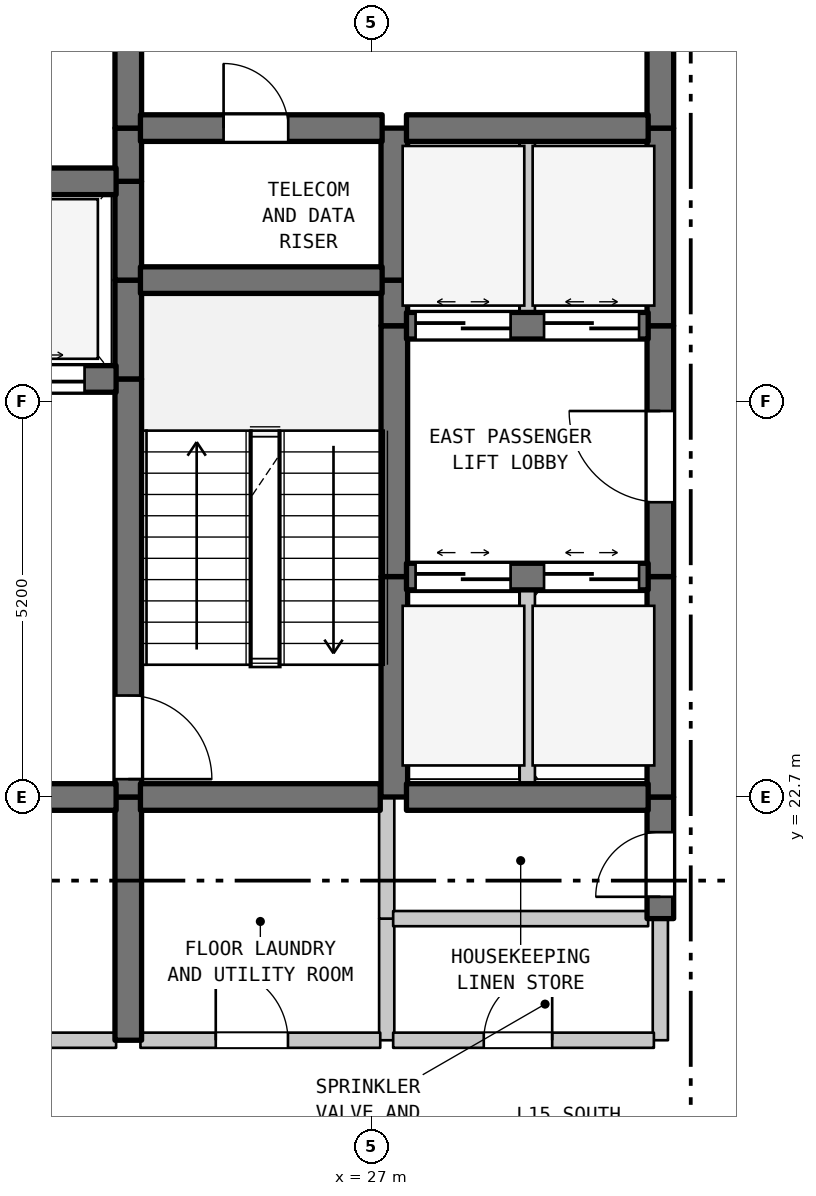
"""IFC4 building model, lengths in metres.
Left out: names, types, materials, properties, quantities, classifications, styles, units other than length and angle.
Written with IfcOpenShell. Run it as: python <this file> out.ifc"""

import sys

from ifc_helpers import new_model, si_unit, direction, frame, frame_2d, origin, place, context, subcontext, project, spatial, rectangle, extrude, element, fill, save


model = new_model("IFC4")
c1 = context("Model", 3, precision=1e-05, world=origin(), true_north=direction((0.0, 1.0)))
c2 = subcontext(c1, "Body", "Model", "MODEL_VIEW")
j1 = project(units=[si_unit("LENGTHUNIT", "METRE"), si_unit("PLANEANGLEUNIT", "RADIAN")], contexts=[c1])
p1 = place(None, origin())
s1 = spatial("IfcSite", under=j1, at=p1, CompositionType="ELEMENT")
p2 = place(p1, origin())
s2 = spatial("IfcBuilding", under=s1, at=p2, CompositionType="ELEMENT")
p3 = place(p2, frame((0.0, 0.0, 65.6)))
s3 = spatial("IfcBuildingStorey", under=s2, at=p3, CompositionType="ELEMENT", Elevation=65.6)
p4 = place(p3, frame((23.8, 19.5, 0.0), z_axis=(0.0, 0.0, 1.0), x_axis=(0.0, 1.0, 0.0)))
e1 = element("IfcWall", 1, at=p4, inside=s3, PredefinedType="SHEAR", context=c2, shape_type="SweptSolid", body=[
    extrude(rectangle(XDim=3.2, YDim=0.35, at=frame_2d((1.6, 0.0))), origin(), (0.0, 0.0, 1.0), 4.185),
])
p5 = place(p3, frame((23.8, 22.7, 0.0), z_axis=(0.0, 0.0, 1.0), x_axis=(0.0, 1.0, 0.0)))
e2 = element("IfcWall", 2, at=p5, inside=s3, PredefinedType="SHEAR", context=c2, shape_type="SweptSolid", body=[
    extrude(rectangle(XDim=5.5, YDim=0.35, at=frame_2d((2.75, 0.0))), origin(), (0.0, 0.0, 1.0), 4.185),
])
p6 = place(p5, frame((0.235, 0.0, 0.0)))
e3 = element("IfcOpeningElement", 3, at=p6, cuts=e2, PredefinedType="OPENING", context=c2, shape_type="SweptSolid", body=[
    extrude(rectangle(XDim=1.1, YDim=2.15, at=frame_2d((0.55, 1.075))), frame((0.0, 0.185, 0.0), z_axis=(0.0, -1.0, 0.0), x_axis=(1.0, 0.0, 0.0)), (0.0, 0.0, 1.0), 0.37),
])
for number, where, z_axis, x_axis in (
    (4, (23.8, 28.2, 0.0), (0.0, 0.0, 1.0), (0.0, 1.0, 0.0)),
    (5, (23.8, 29.5, 0.0), (0.0, 0.0, 1.0), (0.0, 1.0, 0.0)),
):
    element("IfcWall", number, at=place(p3, frame(where, z_axis=z_axis, x_axis=x_axis)), inside=s3, PredefinedType="SHEAR", context=c2, shape_type="SweptSolid", body=[
        extrude(rectangle(XDim=1.3, YDim=0.35, at=frame_2d((0.65, 0.0))), origin(), (0.0, 0.0, 1.0), 4.185),
    ])
p7 = place(p3, frame((23.8, 30.8, 0.0), z_axis=(0.0, 0.0, 1.0), x_axis=(0.0, 1.0, 0.0)))
e6 = element("IfcWall", 6, at=p7, inside=s3, PredefinedType="SHEAR", context=c2, shape_type="SweptSolid", body=[
    extrude(rectangle(XDim=0.7, YDim=0.35, at=frame_2d((0.35, 0.0))), origin(), (0.0, 0.0, 1.0), 4.185),
])
p8 = place(p3, frame((23.8, 31.5, 0.0), z_axis=(0.0, 0.0, 1.0), x_axis=(0.0, 1.0, 0.0)))
e7 = element("IfcWall", 7, at=p8, inside=s3, PredefinedType="SHEAR", context=c2, shape_type="SweptSolid", body=[
    extrude(rectangle(XDim=3.5, YDim=0.35, at=frame_2d((1.75, 0.0))), origin(), (0.0, 0.0, 1.0), 4.185),
])
p9 = place(p8, frame((1.127, 0.0, 0.0)))
e8 = element("IfcOpeningElement", 8, at=p9, cuts=e7, PredefinedType="OPENING", context=c2, shape_type="SweptSolid", body=[
    extrude(rectangle(XDim=1.1, YDim=2.15, at=frame_2d((0.55, 1.075))), frame((0.0, 0.185, 0.0), z_axis=(0.0, -1.0, 0.0), x_axis=(1.0, 0.0, 0.0)), (0.0, 0.0, 1.0), 0.37),
])
p10 = place(p3, frame((27.2, 19.5, 0.0), z_axis=(0.0, 0.0, 1.0), x_axis=(0.0, 1.0, 0.0)))
e9 = element("IfcWall", 9, at=p10, inside=s3, PredefinedType="STANDARD", context=c2, shape_type="SweptSolid", body=[
    extrude(rectangle(XDim=1.6, YDim=0.2, at=frame_2d((0.8, 0.0))), origin(), (0.0, 0.0, 1.0), 4.185),
])
p11 = place(p3, frame((27.2, 21.1, 0.0), z_axis=(0.0, 0.0, 1.0), x_axis=(0.0, 1.0, 0.0)))
e10 = element("IfcWall", 10, at=p11, inside=s3, PredefinedType="STANDARD", context=c2, shape_type="SweptSolid", body=[
    extrude(rectangle(XDim=1.6, YDim=0.2, at=frame_2d((0.8, 0.0))), origin(), (0.0, 0.0, 1.0), 4.185),
])
p12 = place(p3, frame((27.3, 22.7, 0.0), z_axis=(0.0, 0.0, 1.0), x_axis=(0.0, 1.0, 0.0)))
e11 = element("IfcWall", 11, at=p12, inside=s3, PredefinedType="SHEAR", context=c2, shape_type="SweptSolid", body=[
    extrude(rectangle(XDim=2.9, YDim=0.35, at=frame_2d((1.45, 0.0))), origin(), (0.0, 0.0, 1.0), 4.185),
])
p13 = place(p3, frame((27.3, 25.6, 0.0), z_axis=(0.0, 0.0, 1.0), x_axis=(0.0, 1.0, 0.0)))
e12 = element("IfcWall", 12, at=p13, inside=s3, PredefinedType="SHEAR", context=c2, shape_type="SweptSolid", body=[
    extrude(rectangle(XDim=3.3, YDim=0.35, at=frame_2d((1.65, 0.0))), origin(), (0.0, 0.0, 1.0), 4.185),
])
p14 = place(p3, frame((27.3, 28.9, 0.0), z_axis=(0.0, 0.0, 1.0), x_axis=(0.0, 1.0, 0.0)))
e13 = element("IfcWall", 13, at=p14, inside=s3, PredefinedType="SHEAR", context=c2, shape_type="SweptSolid", body=[
    extrude(rectangle(XDim=0.6, YDim=0.35, at=frame_2d((0.3, 0.0))), origin(), (0.0, 0.0, 1.0), 4.185),
])
p15 = place(p3, frame((27.3, 29.5, 0.0), z_axis=(0.0, 0.0, 1.0), x_axis=(0.0, 1.0, 0.0)))
e14 = element("IfcWall", 14, at=p15, inside=s3, PredefinedType="SHEAR", context=c2, shape_type="SweptSolid", body=[
    extrude(rectangle(XDim=2.0, YDim=0.35, at=frame_2d((1.0, 0.0))), origin(), (0.0, 0.0, 1.0), 4.185),
])
p16 = place(p3, frame((29.05, 22.7, 0.0), z_axis=(0.0, 0.0, 1.0), x_axis=(0.0, 1.0, 0.0)))
e15 = element("IfcWall", 15, at=p16, inside=s3, PredefinedType="STANDARD", context=c2, shape_type="SweptSolid", body=[
    extrude(rectangle(XDim=2.9, YDim=0.2, at=frame_2d((1.45, 0.0))), origin(), (0.0, 0.0, 1.0), 4.185),
])
p17 = place(p3, frame((29.05, 28.9, 0.0), z_axis=(0.0, 0.0, 1.0), x_axis=(0.0, 1.0, 0.0)))
e16 = element("IfcWall", 16, at=p17, inside=s3, PredefinedType="STANDARD", context=c2, shape_type="SweptSolid", body=[
    extrude(rectangle(XDim=2.6, YDim=0.2, at=frame_2d((1.3, 0.0))), origin(), (0.0, 0.0, 1.0), 4.185),
])
p18 = place(p3, frame((30.8, 19.5, 0.0), z_axis=(0.0, 0.0, 1.0), x_axis=(0.0, 1.0, 0.0)))
e17 = element("IfcWall", 17, at=p18, inside=s3, PredefinedType="STANDARD", context=c2, shape_type="SweptSolid", body=[
    extrude(rectangle(XDim=1.6, YDim=0.2, at=frame_2d((0.8, 0.0))), origin(), (0.0, 0.0, 1.0), 4.185),
])
p19 = place(p3, frame((30.8, 21.1, 0.0), z_axis=(0.0, 0.0, 1.0), x_axis=(0.0, 1.0, 0.0)))
e18 = element("IfcWall", 18, at=p19, inside=s3, PredefinedType="SHEAR", context=c2, shape_type="SweptSolid", body=[
    extrude(rectangle(XDim=1.6, YDim=0.35, at=frame_2d((0.8, 0.0))), origin(), (0.0, 0.0, 1.0), 4.185),
])
p20 = place(p19, frame((0.287, 0.0, 0.0)))
e19 = element("IfcOpeningElement", 19, at=p20, cuts=e18, PredefinedType="OPENING", context=c2, shape_type="SweptSolid", body=[
    extrude(rectangle(XDim=0.85, YDim=2.1, at=frame_2d((0.425, 1.05))), frame((0.0, 0.185, 0.0), z_axis=(0.0, -1.0, 0.0), x_axis=(1.0, 0.0, 0.0)), (0.0, 0.0, 1.0), 0.37),
])
p21 = place(p3, frame((30.8, 22.7, 0.0), z_axis=(0.0, 0.0, 1.0), x_axis=(0.0, 1.0, 0.0)))
e20 = element("IfcWall", 20, at=p21, inside=s3, PredefinedType="SHEAR", context=c2, shape_type="SweptSolid", body=[
    extrude(rectangle(XDim=2.9, YDim=0.35, at=frame_2d((1.45, 0.0))), origin(), (0.0, 0.0, 1.0), 4.185),
])
p22 = place(p3, frame((30.8, 25.6, 0.0), z_axis=(0.0, 0.0, 1.0), x_axis=(0.0, 1.0, 0.0)))
e21 = element("IfcWall", 21, at=p22, inside=s3, PredefinedType="SHEAR", context=c2, shape_type="SweptSolid", body=[
    extrude(rectangle(XDim=3.3, YDim=0.35, at=frame_2d((1.65, 0.0))), origin(), (0.0, 0.0, 1.0), 4.185),
])
p23 = place(p22, frame((0.978, 0.0, 0.0)))
e22 = element("IfcOpeningElement", 22, at=p23, cuts=e21, PredefinedType="OPENING", context=c2, shape_type="SweptSolid", body=[
    extrude(rectangle(XDim=1.2, YDim=2.2, at=frame_2d((0.6, 1.1))), frame((0.0, 0.185, 0.0), z_axis=(0.0, -1.0, 0.0), x_axis=(1.0, 0.0, 0.0)), (0.0, 0.0, 1.0), 0.37),
])
p24 = place(p3, frame((30.8, 28.9, 0.0), z_axis=(0.0, 0.0, 1.0), x_axis=(0.0, 1.0, 0.0)))
e23 = element("IfcWall", 23, at=p24, inside=s3, PredefinedType="SHEAR", context=c2, shape_type="SweptSolid", body=[
    extrude(rectangle(XDim=2.6, YDim=0.35, at=frame_2d((1.3, 0.0))), origin(), (0.0, 0.0, 1.0), 4.185),
])
p25 = place(p3, frame((30.8, 31.5, 0.0), z_axis=(0.0, 0.0, 1.0), x_axis=(0.0, 1.0, 0.0)))
e24 = element("IfcWall", 24, at=p25, inside=s3, PredefinedType="SHEAR", context=c2, shape_type="SweptSolid", body=[
    extrude(rectangle(XDim=3.5, YDim=0.35, at=frame_2d((1.75, 0.0))), origin(), (0.0, 0.0, 1.0), 4.185),
])
p26 = place(p25, frame((1.15, 0.0, 0.0)))
e25 = element("IfcOpeningElement", 25, at=p26, cuts=e24, PredefinedType="OPENING", context=c2, shape_type="SweptSolid", body=[
    extrude(rectangle(XDim=1.2, YDim=2.2, at=frame_2d((0.6, 1.1))), frame((0.0, 0.185, 0.0), z_axis=(0.0, -1.0, 0.0), x_axis=(1.0, 0.0, 0.0)), (0.0, 0.0, 1.0), 0.37),
])
p27 = place(p3, frame((19.16, 19.5, 0.0), z_axis=(0.0, 0.0, 1.0), x_axis=(1.0, 0.0, 0.0)))
e26 = element("IfcWall", 26, at=p27, inside=s3, PredefinedType="STANDARD", context=c2, shape_type="SweptSolid", body=[
    extrude(rectangle(XDim=4.48, YDim=0.2, at=frame_2d((2.24, 0.0))), origin(), (0.0, 0.0, 1.0), 4.185),
])
p28 = place(p27, frame((1.64, 0.0, 0.0)))
e27 = element("IfcOpeningElement", 27, at=p28, cuts=e26, PredefinedType="OPENING", context=c2, shape_type="SweptSolid", body=[
    extrude(rectangle(XDim=1.2, YDim=2.2, at=frame_2d((0.6, 1.1))), frame((0.0, 0.11, 0.0), z_axis=(0.0, -1.0, 0.0), x_axis=(1.0, 0.0, 0.0)), (0.0, 0.0, 1.0), 0.22),
])
p29 = place(p3, frame((23.96, 19.5, 0.0), z_axis=(0.0, 0.0, 1.0), x_axis=(1.0, 0.0, 0.0)))
e28 = element("IfcWall", 28, at=p29, inside=s3, PredefinedType="STANDARD", context=c2, shape_type="SweptSolid", body=[
    extrude(rectangle(XDim=3.155, YDim=0.2, at=frame_2d((1.578, 0.0))), origin(), (0.0, 0.0, 1.0), 4.185),
])
p30 = place(p29, frame((0.991, 0.0, 0.0)))
e29 = element("IfcOpeningElement", 29, at=p30, cuts=e28, PredefinedType="OPENING", context=c2, shape_type="SweptSolid", body=[
    extrude(rectangle(XDim=0.95, YDim=2.15, at=frame_2d((0.475, 1.075))), frame((0.0, 0.11, 0.0), z_axis=(0.0, -1.0, 0.0), x_axis=(1.0, 0.0, 0.0)), (0.0, 0.0, 1.0), 0.22),
])
p31 = place(p3, frame((27.285, 19.5, 0.0), z_axis=(0.0, 0.0, 1.0), x_axis=(1.0, 0.0, 0.0)))
e30 = element("IfcWall", 30, at=p31, inside=s3, PredefinedType="STANDARD", context=c2, shape_type="SweptSolid", body=[
    extrude(rectangle(XDim=3.43, YDim=0.2, at=frame_2d((1.715, 0.0))), origin(), (0.0, 0.0, 1.0), 4.185),
])
p32 = place(p31, frame((1.192, 0.0, 0.0)))
e31 = element("IfcOpeningElement", 31, at=p32, cuts=e30, PredefinedType="OPENING", context=c2, shape_type="SweptSolid", body=[
    extrude(rectangle(XDim=0.9, YDim=2.15, at=frame_2d((0.45, 1.075))), frame((0.0, 0.11, 0.0), z_axis=(0.0, -1.0, 0.0), x_axis=(1.0, 0.0, 0.0)), (0.0, 0.0, 1.0), 0.22),
])
p33 = place(p3, frame((27.285, 21.1, 0.0), z_axis=(0.0, 0.0, 1.0), x_axis=(1.0, 0.0, 0.0)))
e32 = element("IfcWall", 32, at=p33, inside=s3, PredefinedType="STANDARD", context=c2, shape_type="SweptSolid", body=[
    extrude(rectangle(XDim=3.355, YDim=0.2, at=frame_2d((1.677, 0.0))), origin(), (0.0, 0.0, 1.0), 4.185),
])
p34 = place(p3, frame((19.16, 22.7, 0.0), z_axis=(0.0, 0.0, 1.0), x_axis=(1.0, 0.0, 0.0)))
e33 = element("IfcWall", 33, at=p34, inside=s3, PredefinedType="SHEAR", context=c2, shape_type="SweptSolid", body=[
    extrude(rectangle(XDim=4.48, YDim=0.35, at=frame_2d((2.24, 0.0))), origin(), (0.0, 0.0, 1.0), 4.185),
])
p35 = place(p34, frame((1.64, 0.0, 0.0)))
e34 = element("IfcOpeningElement", 34, at=p35, cuts=e33, PredefinedType="OPENING", context=c2, shape_type="SweptSolid", body=[
    extrude(rectangle(XDim=1.2, YDim=2.2, at=frame_2d((0.6, 1.1))), frame((0.0, 0.185, 0.0), z_axis=(0.0, -1.0, 0.0), x_axis=(1.0, 0.0, 0.0)), (0.0, 0.0, 1.0), 0.37),
])
p36 = place(p3, frame((23.96, 22.7, 0.0), z_axis=(0.0, 0.0, 1.0), x_axis=(1.0, 0.0, 0.0)))
e35 = element("IfcWall", 35, at=p36, inside=s3, PredefinedType="SHEAR", context=c2, shape_type="SweptSolid", body=[
    extrude(rectangle(XDim=3.155, YDim=0.35, at=frame_2d((1.578, 0.0))), origin(), (0.0, 0.0, 1.0), 4.185),
])
p37 = place(p3, frame((27.46, 22.7, 0.0), z_axis=(0.0, 0.0, 1.0), x_axis=(1.0, 0.0, 0.0)))
e36 = element("IfcWall", 36, at=p37, inside=s3, PredefinedType="SHEAR", context=c2, shape_type="SweptSolid", body=[
    extrude(rectangle(XDim=3.18, YDim=0.35, at=frame_2d((1.59, 0.0))), origin(), (0.0, 0.0, 1.0), 4.185),
])
p38 = place(p3, frame((27.46, 25.6, 0.0), z_axis=(0.0, 0.0, 1.0), x_axis=(1.0, 0.0, 0.0)))
e37 = element("IfcWall", 37, at=p38, inside=s3, PredefinedType="SHEAR", context=c2, shape_type="SweptSolid", body=[
    extrude(rectangle(XDim=3.18, YDim=0.35, at=frame_2d((1.59, 0.0))), origin(), (0.0, 0.0, 1.0), 4.185),
])
p39 = place(p38, frame((0.12, 0.0, 0.0)))
e38 = element("IfcOpeningElement", 38, at=p39, cuts=e37, PredefinedType="OPENING", context=c2, shape_type="SweptSolid", body=[
    extrude(rectangle(XDim=1.25, YDim=2.2, at=frame_2d((0.625, 1.1))), frame((0.0, 0.185, 0.0), z_axis=(0.0, -1.0, 0.0), x_axis=(1.0, 0.0, 0.0)), (0.0, 0.0, 1.0), 0.37),
])
p40 = place(p38, frame((1.81, 0.0, 0.0)))
e39 = element("IfcOpeningElement", 39, at=p40, cuts=e37, PredefinedType="OPENING", context=c2, shape_type="SweptSolid", body=[
    extrude(rectangle(XDim=1.25, YDim=2.2, at=frame_2d((0.625, 1.1))), frame((0.0, 0.185, 0.0), z_axis=(0.0, -1.0, 0.0), x_axis=(1.0, 0.0, 0.0)), (0.0, 0.0, 1.0), 0.37),
])
p41 = place(p3, frame((19.16, 28.2, 0.0), z_axis=(0.0, 0.0, 1.0), x_axis=(1.0, 0.0, 0.0)))
e40 = element("IfcWall", 40, at=p41, inside=s3, PredefinedType="SHEAR", context=c2, shape_type="SweptSolid", body=[
    extrude(rectangle(XDim=4.48, YDim=0.35, at=frame_2d((2.24, 0.0))), origin(), (0.0, 0.0, 1.0), 4.185),
])
p42 = place(p41, frame((0.415, 0.0, 0.0)))
e41 = element("IfcOpeningElement", 41, at=p42, cuts=e40, PredefinedType="OPENING", context=c2, shape_type="SweptSolid", body=[
    extrude(rectangle(XDim=1.25, YDim=2.2, at=frame_2d((0.625, 1.1))), frame((0.0, 0.185, 0.0), z_axis=(0.0, -1.0, 0.0), x_axis=(1.0, 0.0, 0.0)), (0.0, 0.0, 1.0), 0.37),
])
p43 = place(p41, frame((2.815, 0.0, 0.0)))
e42 = element("IfcOpeningElement", 42, at=p43, cuts=e40, PredefinedType="OPENING", context=c2, shape_type="SweptSolid", body=[
    extrude(rectangle(XDim=1.25, YDim=2.2, at=frame_2d((0.625, 1.1))), frame((0.0, 0.185, 0.0), z_axis=(0.0, -1.0, 0.0), x_axis=(1.0, 0.0, 0.0)), (0.0, 0.0, 1.0), 0.37),
])
p44 = place(p3, frame((27.46, 28.9, 0.0), z_axis=(0.0, 0.0, 1.0), x_axis=(1.0, 0.0, 0.0)))
e43 = element("IfcWall", 43, at=p44, inside=s3, PredefinedType="SHEAR", context=c2, shape_type="SweptSolid", body=[
    extrude(rectangle(XDim=3.18, YDim=0.35, at=frame_2d((1.59, 0.0))), origin(), (0.0, 0.0, 1.0), 4.185),
])
p45 = place(p44, frame((0.12, 0.0, 0.0)))
e44 = element("IfcOpeningElement", 44, at=p45, cuts=e43, PredefinedType="OPENING", context=c2, shape_type="SweptSolid", body=[
    extrude(rectangle(XDim=1.25, YDim=2.2, at=frame_2d((0.625, 1.1))), frame((0.0, 0.185, 0.0), z_axis=(0.0, -1.0, 0.0), x_axis=(1.0, 0.0, 0.0)), (0.0, 0.0, 1.0), 0.37),
])
p46 = place(p44, frame((1.81, 0.0, 0.0)))
e45 = element("IfcOpeningElement", 45, at=p46, cuts=e43, PredefinedType="OPENING", context=c2, shape_type="SweptSolid", body=[
    extrude(rectangle(XDim=1.25, YDim=2.2, at=frame_2d((0.625, 1.1))), frame((0.0, 0.185, 0.0), z_axis=(0.0, -1.0, 0.0), x_axis=(1.0, 0.0, 0.0)), (0.0, 0.0, 1.0), 0.37),
])
p47 = place(p3, frame((23.96, 29.5, 0.0), z_axis=(0.0, 0.0, 1.0), x_axis=(1.0, 0.0, 0.0)))
e46 = element("IfcWall", 46, at=p47, inside=s3, PredefinedType="SHEAR", context=c2, shape_type="SweptSolid", body=[
    extrude(rectangle(XDim=3.18, YDim=0.35, at=frame_2d((1.59, 0.0))), origin(), (0.0, 0.0, 1.0), 4.185),
])
p48 = place(p3, frame((19.16, 30.8, 0.0), z_axis=(0.0, 0.0, 1.0), x_axis=(1.0, 0.0, 0.0)))
e47 = element("IfcWall", 47, at=p48, inside=s3, PredefinedType="SHEAR", context=c2, shape_type="SweptSolid", body=[
    extrude(rectangle(XDim=4.48, YDim=0.35, at=frame_2d((2.24, 0.0))), origin(), (0.0, 0.0, 1.0), 4.185),
])
p49 = place(p3, frame((23.96, 31.5, 0.0), z_axis=(0.0, 0.0, 1.0), x_axis=(1.0, 0.0, 0.0)))
e48 = element("IfcWall", 48, at=p49, inside=s3, PredefinedType="SHEAR", context=c2, shape_type="SweptSolid", body=[
    extrude(rectangle(XDim=3.18, YDim=0.35, at=frame_2d((1.59, 0.0))), origin(), (0.0, 0.0, 1.0), 4.185),
])
p50 = place(p49, frame((1.094, 0.0, 0.0)))
e49 = element("IfcOpeningElement", 49, at=p50, cuts=e48, PredefinedType="OPENING", context=c2, shape_type="SweptSolid", body=[
    extrude(rectangle(XDim=0.85, YDim=2.1, at=frame_2d((0.425, 1.05))), frame((0.0, 0.185, 0.0), z_axis=(0.0, -1.0, 0.0), x_axis=(1.0, 0.0, 0.0)), (0.0, 0.0, 1.0), 0.37),
])
p51 = place(p3, frame((27.46, 31.5, 0.0), z_axis=(0.0, 0.0, 1.0), x_axis=(1.0, 0.0, 0.0)))
e50 = element("IfcWall", 50, at=p51, inside=s3, PredefinedType="SHEAR", context=c2, shape_type="SweptSolid", body=[
    extrude(rectangle(XDim=3.18, YDim=0.35, at=frame_2d((1.59, 0.0))), origin(), (0.0, 0.0, 1.0), 4.185),
])
p52 = place(p6, frame((1.1, 0.0, 0.0), z_axis=(0.0, 0.0, 1.0), x_axis=(-1.0, 0.0, 0.0)))
e51 = element("IfcDoor", 51, at=p52, inside=s3, OperationType="SINGLE_SWING_LEFT", PredefinedType="DOOR", context=c2, shape_type="SweptSolid", body=[
    extrude(rectangle(XDim=1.1, YDim=2.15, at=frame_2d((0.55, 1.075))), frame((0.0, 0.025, 0.0), z_axis=(0.0, -1.0, 0.0), x_axis=(1.0, 0.0, 0.0)), (0.0, 0.0, 1.0), 0.05),
])
fill(e3, e51)
p53 = place(p20, origin())
e52 = element("IfcDoor", 52, at=p53, inside=s3, OperationType="SINGLE_SWING_LEFT", PredefinedType="DOOR", context=c2, shape_type="SweptSolid", body=[
    extrude(rectangle(XDim=0.85, YDim=2.1, at=frame_2d((0.425, 1.05))), frame((0.0, 0.025, 0.0), z_axis=(0.0, -1.0, 0.0), x_axis=(1.0, 0.0, 0.0)), (0.0, 0.0, 1.0), 0.05),
])
fill(e19, e52)
p54 = place(p23, origin())
e53 = element("IfcDoor", 53, at=p54, inside=s3, OperationType="SINGLE_SWING_RIGHT", PredefinedType="DOOR", context=c2, shape_type="SweptSolid", body=[
    extrude(rectangle(XDim=1.2, YDim=2.2, at=frame_2d((0.6, 1.1))), frame((0.0, 0.025, 0.0), z_axis=(0.0, -1.0, 0.0), x_axis=(1.0, 0.0, 0.0)), (0.0, 0.0, 1.0), 0.05),
])
fill(e22, e53)
p55 = place(p30, origin())
e54 = element("IfcDoor", 54, at=p55, inside=s3, OperationType="SINGLE_SWING_LEFT", PredefinedType="DOOR", context=c2, shape_type="SweptSolid", body=[
    extrude(rectangle(XDim=0.95, YDim=2.15, at=frame_2d((0.475, 1.075))), frame((0.0, 0.025, 0.0), z_axis=(0.0, -1.0, 0.0), x_axis=(1.0, 0.0, 0.0)), (0.0, 0.0, 1.0), 0.05),
])
fill(e29, e54)
p56 = place(p32, origin())
e55 = element("IfcDoor", 55, at=p56, inside=s3, OperationType="SINGLE_SWING_RIGHT", PredefinedType="DOOR", context=c2, shape_type="SweptSolid", body=[
    extrude(rectangle(XDim=0.9, YDim=2.15, at=frame_2d((0.45, 1.075))), frame((0.0, 0.025, 0.0), z_axis=(0.0, -1.0, 0.0), x_axis=(1.0, 0.0, 0.0)), (0.0, 0.0, 1.0), 0.05),
])
fill(e31, e55)
p57 = place(p39, origin())
e56 = element("IfcDoor", 56, at=p57, inside=s3, OperationType="DOUBLE_DOOR_SLIDING", PredefinedType="DOOR", context=c2, shape_type="SweptSolid", body=[
    extrude(rectangle(XDim=1.25, YDim=2.2, at=frame_2d((0.625, 1.1))), frame((0.0, 0.025, 0.0), z_axis=(0.0, -1.0, 0.0), x_axis=(1.0, 0.0, 0.0)), (0.0, 0.0, 1.0), 0.05),
])
fill(e38, e56)
p58 = place(p40, origin())
e57 = element("IfcDoor", 57, at=p58, inside=s3, OperationType="DOUBLE_DOOR_SLIDING", PredefinedType="DOOR", context=c2, shape_type="SweptSolid", body=[
    extrude(rectangle(XDim=1.25, YDim=2.2, at=frame_2d((0.625, 1.1))), frame((0.0, 0.025, 0.0), z_axis=(0.0, -1.0, 0.0), x_axis=(1.0, 0.0, 0.0)), (0.0, 0.0, 1.0), 0.05),
])
fill(e39, e57)
p59 = place(p43, origin())
e58 = element("IfcDoor", 58, at=p59, inside=s3, OperationType="DOUBLE_DOOR_SLIDING", PredefinedType="DOOR", context=c2, shape_type="SweptSolid", body=[
    extrude(rectangle(XDim=1.25, YDim=2.2, at=frame_2d((0.625, 1.1))), frame((0.0, 0.025, 0.0), z_axis=(0.0, -1.0, 0.0), x_axis=(1.0, 0.0, 0.0)), (0.0, 0.0, 1.0), 0.05),
])
fill(e42, e58)
p60 = place(p45, origin())
e59 = element("IfcDoor", 59, at=p60, inside=s3, OperationType="DOUBLE_DOOR_SLIDING", PredefinedType="DOOR", context=c2, shape_type="SweptSolid", body=[
    extrude(rectangle(XDim=1.25, YDim=2.2, at=frame_2d((0.625, 1.1))), frame((0.0, 0.025, 0.0), z_axis=(0.0, -1.0, 0.0), x_axis=(1.0, 0.0, 0.0)), (0.0, 0.0, 1.0), 0.05),
])
fill(e44, e59)
p61 = place(p46, origin())
e60 = element("IfcDoor", 60, at=p61, inside=s3, OperationType="DOUBLE_DOOR_SLIDING", PredefinedType="DOOR", context=c2, shape_type="SweptSolid", body=[
    extrude(rectangle(XDim=1.25, YDim=2.2, at=frame_2d((0.625, 1.1))), frame((0.0, 0.025, 0.0), z_axis=(0.0, -1.0, 0.0), x_axis=(1.0, 0.0, 0.0)), (0.0, 0.0, 1.0), 0.05),
])
fill(e45, e60)
p62 = place(p50, origin())
e61 = element("IfcDoor", 61, at=p62, inside=s3, OperationType="SINGLE_SWING_LEFT", PredefinedType="DOOR", context=c2, shape_type="SweptSolid", body=[
    extrude(rectangle(XDim=0.85, YDim=2.1, at=frame_2d((0.425, 1.05))), frame((0.0, 0.025, 0.0), z_axis=(0.0, -1.0, 0.0), x_axis=(1.0, 0.0, 0.0)), (0.0, 0.0, 1.0), 0.05),
])
fill(e49, e61)
save(model, sys.argv[1])
